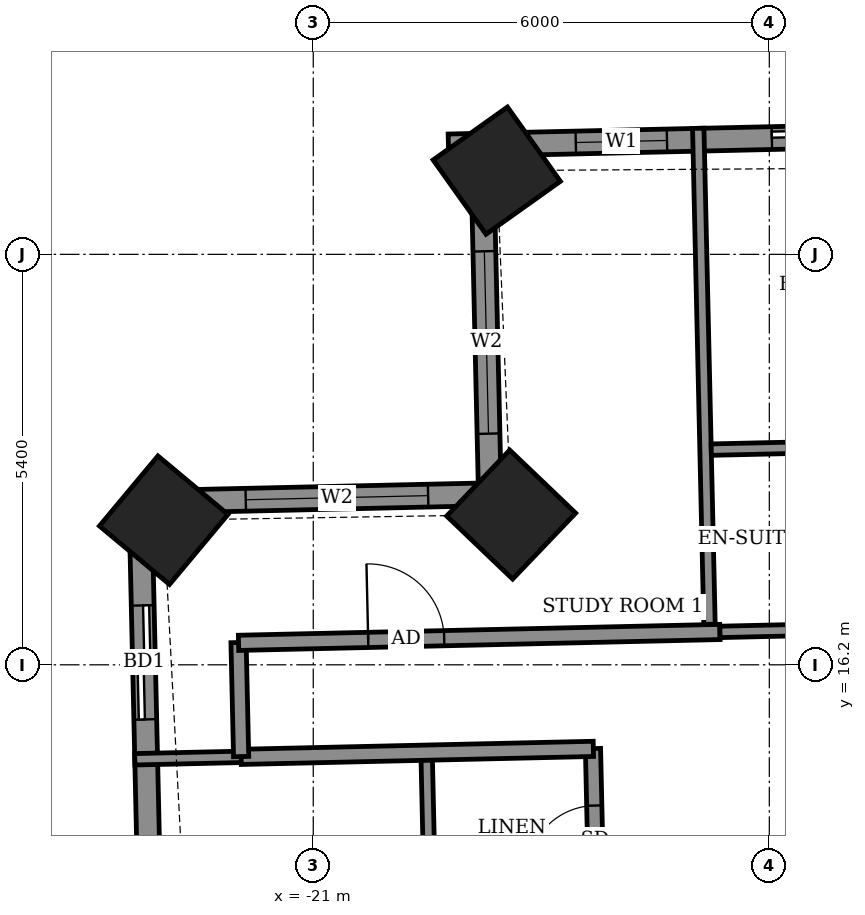
"""IFC4 building model, lengths in metres.
Left out: names, types, materials, properties, quantities, classifications, styles, units other than length and angle.
Written with IfcOpenShell. Run it as: python <this file> out.ifc"""

import sys

from ifc_helpers import new_model, si_unit, direction, frame, frame_2d, origin, origin_2d, place, context, subcontext, project, spatial, rectangle, extrude, element, fill, save


model = new_model("IFC4")
c1 = context("Model", 3, precision=1e-05, world=origin(), true_north=direction((0.0, 1.0)))
c2 = subcontext(c1, "Body", "Model", "MODEL_VIEW")
j1 = project(units=[si_unit("LENGTHUNIT", "METRE"), si_unit("PLANEANGLEUNIT", "RADIAN")], contexts=[c1])
p1 = place(None, origin())
s1 = spatial("IfcSite", under=j1, at=p1, CompositionType="ELEMENT")
p2 = place(p1, origin())
s2 = spatial("IfcBuilding", under=s1, at=p2, CompositionType="ELEMENT")
p3 = place(p2, frame((0.0, 0.0, 189.7)))
s3 = spatial("IfcBuildingStorey", under=s2, at=p3, CompositionType="ELEMENT", Elevation=189.7)
for number, where, z_axis, x_axis in (
    (1, (-18.586, 22.701, -0.55), (0.0, 0.0, 1.0), (-0.815, -0.58, 0.0)),
    (2, (-18.396, 18.177, -0.55), (0.0, 0.0, 1.0), (-0.691, -0.723, 0.0)),
    (3, (-22.968, 18.103, -0.55), (0.0, 0.0, 1.0), (-0.641, -0.768, 0.0)),
):
    element("IfcColumn", number, at=place(p3, frame(where, z_axis=z_axis, x_axis=x_axis)), inside=s3, PredefinedType="COLUMN", context=c2, shape_type="SweptSolid", body=[
        extrude(rectangle(XDim=1.2, YDim=1.2, at=origin_2d()), origin(), (0.0, 0.0, 1.0), 3.6),
    ])
p4 = place(p3, frame((21.589, 23.959, 0.0), z_axis=(0.0, 0.0, 1.0), x_axis=(-0.999742668524, -0.022684724649, 0.0)))
e4 = element("IfcWall", 4, at=p4, inside=s3, PredefinedType="SOLIDWALL", context=c2, shape_type="SweptSolid", body=[
    extrude(rectangle(XDim=40.822, YDim=0.3, at=frame_2d((20.411, 0.0))), origin(), (0.0, 0.0, 1.0), 3.05),
])
p5 = place(p4, frame((1.553, 0.0, 0.0)))
e5 = element("IfcOpeningElement", 5, at=p5, cuts=e4, PredefinedType="OPENING", context=c2, shape_type="SweptSolid", body=[
    extrude(rectangle(XDim=1.5, YDim=2.4, at=frame_2d((0.75, 1.2))), frame((0.0, 0.16, 0.0), z_axis=(0.0, -1.0, 0.0), x_axis=(1.0, 0.0, 0.0)), (0.0, 0.0, 1.0), 0.32),
])
p6 = place(p4, frame((4.33, 0.0, 0.0)))
e6 = element("IfcOpeningElement", 6, at=p6, cuts=e4, PredefinedType="OPENING", context=c2, shape_type="SweptSolid", body=[
    extrude(rectangle(XDim=1.5, YDim=2.4, at=frame_2d((0.75, 1.2))), frame((0.0, 0.16, 0.0), z_axis=(0.0, -1.0, 0.0), x_axis=(1.0, 0.0, 0.0)), (0.0, 0.0, 1.0), 0.32),
])
p7 = place(p4, frame((9.43, 0.0, 0.0)))
e7 = element("IfcOpeningElement", 7, at=p7, cuts=e4, PredefinedType="OPENING", context=c2, shape_type="SweptSolid", body=[
    extrude(rectangle(XDim=1.5, YDim=2.4, at=frame_2d((0.75, 1.2))), frame((0.0, 0.16, 0.0), z_axis=(0.0, -1.0, 0.0), x_axis=(1.0, 0.0, 0.0)), (0.0, 0.0, 1.0), 0.32),
])
p8 = place(p4, frame((14.37, 0.0, 0.0)))
e8 = element("IfcOpeningElement", 8, at=p8, cuts=e4, PredefinedType="OPENING", context=c2, shape_type="SweptSolid", body=[
    extrude(rectangle(XDim=1.5, YDim=2.4, at=frame_2d((0.75, 1.2))), frame((0.0, 0.16, 0.0), z_axis=(0.0, -1.0, 0.0), x_axis=(1.0, 0.0, 0.0)), (0.0, 0.0, 1.0), 0.32),
])
p9 = place(p4, frame((17.41, 0.0, 0.0)))
e9 = element("IfcOpeningElement", 9, at=p9, cuts=e4, PredefinedType="OPENING", context=c2, shape_type="SweptSolid", body=[
    extrude(rectangle(XDim=1.5, YDim=2.4, at=frame_2d((0.75, 1.2))), frame((0.0, 0.16, 0.0), z_axis=(0.0, -1.0, 0.0), x_axis=(1.0, 0.0, 0.0)), (0.0, 0.0, 1.0), 0.32),
])
p10 = place(p4, frame((22.03, 0.0, 0.0)))
e10 = element("IfcOpeningElement", 10, at=p10, cuts=e4, PredefinedType="OPENING", context=c2, shape_type="SweptSolid", body=[
    extrude(rectangle(XDim=1.5, YDim=2.4, at=frame_2d((0.75, 1.2))), frame((0.0, 0.16, 0.0), z_axis=(0.0, -1.0, 0.0), x_axis=(1.0, 0.0, 0.0)), (0.0, 0.0, 1.0), 0.32),
])
p11 = place(p4, frame((27.7, 0.0, 0.0)))
e11 = element("IfcOpeningElement", 11, at=p11, cuts=e4, PredefinedType="OPENING", context=c2, shape_type="SweptSolid", body=[
    extrude(rectangle(XDim=1.2, YDim=2.4, at=frame_2d((0.6, 1.2))), frame((0.0, 0.16, 0.0), z_axis=(0.0, -1.0, 0.0), x_axis=(1.0, 0.0, 0.0)), (0.0, 0.0, 1.0), 0.32),
])
p12 = place(p4, frame((30.48, 0.0, 0.0)))
e12 = element("IfcOpeningElement", 12, at=p12, cuts=e4, PredefinedType="OPENING", context=c2, shape_type="SweptSolid", body=[
    extrude(rectangle(XDim=1.5, YDim=2.4, at=frame_2d((0.75, 1.2))), frame((0.0, 0.16, 0.0), z_axis=(0.0, -1.0, 0.0), x_axis=(1.0, 0.0, 0.0)), (0.0, 0.0, 1.0), 0.32),
])
p13 = place(p4, frame((35.065, 0.0, 0.0)))
e13 = element("IfcOpeningElement", 13, at=p13, cuts=e4, PredefinedType="OPENING", context=c2, shape_type="SweptSolid", body=[
    extrude(rectangle(XDim=1.5, YDim=2.4, at=frame_2d((0.75, 1.2))), frame((0.0, 0.16, 0.0), z_axis=(0.0, -1.0, 0.0), x_axis=(1.0, 0.0, 0.0)), (0.0, 0.0, 1.0), 0.32),
])
p14 = place(p4, frame((37.945, 0.0, 0.9)))
e14 = element("IfcOpeningElement", 14, at=p14, cuts=e4, PredefinedType="OPENING", context=c2, shape_type="SweptSolid", body=[
    extrude(rectangle(XDim=1.2, YDim=1.5, at=frame_2d((0.6, 0.75))), frame((0.0, 0.16, 0.0), z_axis=(0.0, -1.0, 0.0), x_axis=(1.0, 0.0, 0.0)), (0.0, 0.0, 1.0), 0.32),
])
p15 = place(p3, frame((-18.781, 23.043, 0.0), z_axis=(0.0, 0.0, 1.0), x_axis=(0.02274729749, -0.999741246752, 0.0)))
e15 = element("IfcWall", 15, at=p15, inside=s3, PredefinedType="SOLIDWALL", context=c2, shape_type="SweptSolid", body=[
    extrude(rectangle(XDim=4.926, YDim=0.3, at=frame_2d((2.463, 0.0))), origin(), (0.0, 0.0, 1.0), 2.55),
])
p16 = place(p15, frame((1.403, 0.0, 0.9)))
e16 = element("IfcOpeningElement", 16, at=p16, cuts=e15, PredefinedType="OPENING", context=c2, shape_type="SweptSolid", body=[
    extrude(rectangle(XDim=2.4, YDim=1.5, at=frame_2d((1.2, 0.75))), frame((0.0, 0.16, 0.0), z_axis=(0.0, -1.0, 0.0), x_axis=(1.0, 0.0, 0.0)), (0.0, 0.0, 1.0), 0.32),
])
p17 = place(p3, frame((-18.676, 18.444, 0.0), z_axis=(0.0, 0.0, 1.0), x_axis=(-0.999744377441, -0.022609285172, 0.0)))
e17 = element("IfcWall", 17, at=p17, inside=s3, PredefinedType="SOLIDWALL", context=c2, shape_type="SweptSolid", body=[
    extrude(rectangle(XDim=4.6, YDim=0.3, at=frame_2d((2.3, 0.0))), origin(), (0.0, 0.0, 1.0), 2.55),
])
p18 = place(p17, frame((0.813, 0.0, 0.9)))
e18 = element("IfcOpeningElement", 18, at=p18, cuts=e17, PredefinedType="OPENING", context=c2, shape_type="SweptSolid", body=[
    extrude(rectangle(XDim=2.4, YDim=1.5, at=frame_2d((1.2, 0.75))), frame((0.0, 0.16, 0.0), z_axis=(0.0, -1.0, 0.0), x_axis=(1.0, 0.0, 0.0)), (0.0, 0.0, 1.0), 0.32),
])
p19 = place(p3, frame((-23.275, 18.34, 0.0), z_axis=(0.0, 0.0, 1.0), x_axis=(0.022705985163, -0.999742185885, 0.0)))
e19 = element("IfcWall", 19, at=p19, inside=s3, PredefinedType="SOLIDWALL", context=c2, shape_type="SweptSolid", body=[
    extrude(rectangle(XDim=10.43, YDim=0.3, at=frame_2d((5.215, 0.0))), origin(), (0.0, 0.0, 1.0), 3.05),
])
p20 = place(p19, frame((1.359, 0.0, 0.0)))
e20 = element("IfcOpeningElement", 20, at=p20, cuts=e19, PredefinedType="OPENING", context=c2, shape_type="SweptSolid", body=[
    extrude(rectangle(XDim=1.5, YDim=2.4, at=frame_2d((0.75, 1.2))), frame((0.0, 0.16, 0.0), z_axis=(0.0, -1.0, 0.0), x_axis=(1.0, 0.0, 0.0)), (0.0, 0.0, 1.0), 0.32),
])
p21 = place(p19, frame((6.543, 0.0, 0.9)))
e21 = element("IfcOpeningElement", 21, at=p21, cuts=e19, PredefinedType="OPENING", context=c2, shape_type="SweptSolid", body=[
    extrude(rectangle(XDim=2.4, YDim=1.5, at=frame_2d((1.2, 0.75))), frame((0.0, 0.16, 0.0), z_axis=(0.0, -1.0, 0.0), x_axis=(1.0, 0.0, 0.0)), (0.0, 0.0, 1.0), 0.32),
])
p22 = place(p3, frame((-16.684, -12.919, 0.0), z_axis=(0.0, 0.0, 1.0), x_axis=(-0.022694293906, 0.999742451346, 0.0)))
e22 = element("IfcWall", 22, at=p22, inside=s3, PredefinedType="PARTITIONING", context=c2, shape_type="SweptSolid", body=[
    extrude(rectangle(XDim=28.024, YDim=0.2, at=frame_2d((14.012, 0.0))), origin(), (0.0, 0.0, 1.0), 3.05),
])
p23 = place(p22, frame((22.825, 0.0, 0.0)))
e23 = element("IfcOpeningElement", 23, at=p23, cuts=e22, PredefinedType="OPENING", context=c2, shape_type="SweptSolid", body=[
    extrude(rectangle(XDim=1.0, YDim=2.1, at=frame_2d((0.5, 1.05))), frame((0.0, 0.11, 0.0), z_axis=(0.0, -1.0, 0.0), x_axis=(1.0, 0.0, 0.0)), (0.0, 0.0, 1.0), 0.22),
])
p24 = place(p22, frame((26.374, 0.0, 0.0)))
e24 = element("IfcOpeningElement", 24, at=p24, cuts=e22, PredefinedType="OPENING", context=c2, shape_type="SweptSolid", body=[
    extrude(rectangle(XDim=0.9, YDim=2.1, at=frame_2d((0.45, 1.05))), frame((0.0, 0.11, 0.0), z_axis=(0.0, -1.0, 0.0), x_axis=(1.0, 0.0, 0.0)), (0.0, 0.0, 1.0), 0.22),
])
p25 = place(p22, frame((16.7, 0.0, 0.0)))
e25 = element("IfcOpeningElement", 25, at=p25, cuts=e22, PredefinedType="OPENING", context=c2, shape_type="SweptSolid", body=[
    extrude(rectangle(XDim=1.0, YDim=2.1, at=frame_2d((0.5, 1.05))), frame((0.0, 0.11, 0.0), z_axis=(0.0, -1.0, 0.0), x_axis=(1.0, 0.0, 0.0)), (0.0, 0.0, 1.0), 0.22),
])
p26 = place(p22, frame((19.175, 0.0, 0.0)))
e26 = element("IfcOpeningElement", 26, at=p26, cuts=e22, PredefinedType="OPENING", context=c2, shape_type="SweptSolid", body=[
    extrude(rectangle(XDim=0.9, YDim=2.1, at=frame_2d((0.45, 1.05))), frame((0.0, 0.11, 0.0), z_axis=(0.0, -1.0, 0.0), x_axis=(1.0, 0.0, 0.0)), (0.0, 0.0, 1.0), 0.22),
])
p27 = place(p22, frame((14.725, 0.0, 0.0)))
e27 = element("IfcOpeningElement", 27, at=p27, cuts=e22, PredefinedType="OPENING", context=c2, shape_type="SweptSolid", body=[
    extrude(rectangle(XDim=1.0, YDim=2.1, at=frame_2d((0.5, 1.05))), frame((0.0, 0.11, 0.0), z_axis=(0.0, -1.0, 0.0), x_axis=(1.0, 0.0, 0.0)), (0.0, 0.0, 1.0), 0.22),
])
p28 = place(p22, frame((12.625, 0.0, 0.0)))
e28 = element("IfcOpeningElement", 28, at=p28, cuts=e22, PredefinedType="OPENING", context=c2, shape_type="SweptSolid", body=[
    extrude(rectangle(XDim=0.9, YDim=2.1, at=frame_2d((0.45, 1.05))), frame((0.0, 0.11, 0.0), z_axis=(0.0, -1.0, 0.0), x_axis=(1.0, 0.0, 0.0)), (0.0, 0.0, 1.0), 0.22),
])
p29 = place(p22, frame((10.375, 0.0, 0.0)))
e29 = element("IfcOpeningElement", 29, at=p29, cuts=e22, PredefinedType="OPENING", context=c2, shape_type="SweptSolid", body=[
    extrude(rectangle(XDim=1.0, YDim=2.1, at=frame_2d((0.5, 1.05))), frame((0.0, 0.11, 0.0), z_axis=(0.0, -1.0, 0.0), x_axis=(1.0, 0.0, 0.0)), (0.0, 0.0, 1.0), 0.22),
])
p30 = place(p22, frame((8.125, 0.0, 0.0)))
e30 = element("IfcOpeningElement", 30, at=p30, cuts=e22, PredefinedType="OPENING", context=c2, shape_type="SweptSolid", body=[
    extrude(rectangle(XDim=0.9, YDim=2.1, at=frame_2d((0.45, 1.05))), frame((0.0, 0.11, 0.0), z_axis=(0.0, -1.0, 0.0), x_axis=(1.0, 0.0, 0.0)), (0.0, 0.0, 1.0), 0.22),
])
p31 = place(p22, frame((3.462, 0.0, 0.0)))
e31 = element("IfcOpeningElement", 31, at=p31, cuts=e22, PredefinedType="OPENING", context=c2, shape_type="SweptSolid", body=[
    extrude(rectangle(XDim=1.0, YDim=2.1, at=frame_2d((0.5, 1.05))), frame((0.0, 0.11, 0.0), z_axis=(0.0, -1.0, 0.0), x_axis=(1.0, 0.0, 0.0)), (0.0, 0.0, 1.0), 0.22),
])
p32 = place(p22, frame((5.625, 0.0, 0.0)))
e32 = element("IfcOpeningElement", 32, at=p32, cuts=e22, PredefinedType="OPENING", context=c2, shape_type="SweptSolid", body=[
    extrude(rectangle(XDim=0.9, YDim=2.1, at=frame_2d((0.45, 1.05))), frame((0.0, 0.11, 0.0), z_axis=(0.0, -1.0, 0.0), x_axis=(1.0, 0.0, 0.0)), (0.0, 0.0, 1.0), 0.22),
])
p33 = place(p3, frame((-19.455, 12.649, 0.0), z_axis=(0.0, 0.0, 1.0), x_axis=(-0.022603288534, 0.999744513037, 0.0)))
e33 = element("IfcWall", 33, at=p33, inside=s3, PredefinedType="PARTITIONING", context=c2, shape_type="SweptSolid", body=[
    extrude(rectangle(XDim=2.301, YDim=0.15, at=frame_2d((1.15, 0.0))), origin(), (0.0, 0.0, 1.0), 3.05),
])
p34 = place(p3, frame((-23.348, 14.957, 0.0), z_axis=(0.0, 0.0, 1.0), x_axis=(0.999740216184, 0.022792545827, 0.0)))
e34 = element("IfcWall", 34, at=p34, inside=s3, PredefinedType="PARTITIONING", context=c2, shape_type="SweptSolid", body=[
    extrude(rectangle(XDim=1.403, YDim=0.15, at=frame_2d((0.702, 0.0))), origin(), (0.0, 0.0, 1.0), 2.55),
])
p35 = place(p3, frame((-21.949, 14.989, 0.0), z_axis=(0.0, 0.0, 1.0), x_axis=(0.999743491588, 0.022648422179, 0.0)))
e35 = element("IfcWall", 35, at=p35, inside=s3, PredefinedType="PARTITIONING", context=c2, shape_type="SweptSolid", body=[
    extrude(rectangle(XDim=4.635, YDim=0.2, at=frame_2d((2.318, 0.0))), origin(), (0.0, 0.0, 1.0), 3.05),
])
p36 = place(p3, frame((-21.949, 14.993, 0.0), z_axis=(0.0, 0.0, 1.0), x_axis=(-0.022617910375, 0.999744182344, 0.0)))
e36 = element("IfcWall", 36, at=p36, inside=s3, PredefinedType="PARTITIONING", context=c2, shape_type="SweptSolid", body=[
    extrude(rectangle(XDim=1.5, YDim=0.2, at=frame_2d((0.75, 0.0))), origin(), (0.0, 0.0, 1.0), 3.05),
])
p37 = place(p3, frame((-21.983, 16.489, 0.0), z_axis=(0.0, 0.0, 1.0), x_axis=(0.999744930163, 0.022584831499, 0.0)))
e37 = element("IfcWall", 37, at=p37, inside=s3, PredefinedType="PARTITIONING", context=c2, shape_type="SweptSolid", body=[
    extrude(rectangle(XDim=6.335, YDim=0.2, at=frame_2d((3.167, 0.0))), origin(), (0.0, 0.0, 1.0), 3.05),
])
p38 = place(p37, frame((1.706, 0.0, 0.0)))
e38 = element("IfcOpeningElement", 38, at=p38, cuts=e37, PredefinedType="OPENING", context=c2, shape_type="SweptSolid", body=[
    extrude(rectangle(XDim=1.0, YDim=2.1, at=frame_2d((0.5, 1.05))), frame((0.0, 0.11, 0.0), z_axis=(0.0, -1.0, 0.0), x_axis=(1.0, 0.0, 0.0)), (0.0, 0.0, 1.0), 0.22),
])
p39 = place(p3, frame((-15.649, 16.633, 0.0), z_axis=(0.0, 0.0, 1.0), x_axis=(0.999743261737, 0.022658565952, 0.0)))
e39 = element("IfcWall", 39, at=p39, inside=s3, PredefinedType="PARTITIONING", context=c2, shape_type="SweptSolid", body=[
    extrude(rectangle(XDim=30.536, YDim=0.15, at=frame_2d((15.268, 0.0))), origin(), (0.0, 0.0, 1.0), 3.05),
])
p40 = place(p39, frame((29.536, 0.0, 0.0)))
e40 = element("IfcOpeningElement", 40, at=p40, cuts=e39, PredefinedType="OPENING", context=c2, shape_type="SweptSolid", body=[
    extrude(rectangle(XDim=0.9, YDim=2.1, at=frame_2d((0.45, 1.05))), frame((0.0, 0.085, 0.0), z_axis=(0.0, -1.0, 0.0), x_axis=(1.0, 0.0, 0.0)), (0.0, 0.0, 1.0), 0.17),
])
p41 = place(p39, frame((27.965, 0.0, 0.0)))
e41 = element("IfcOpeningElement", 41, at=p41, cuts=e39, PredefinedType="OPENING", context=c2, shape_type="SweptSolid", body=[
    extrude(rectangle(XDim=0.9, YDim=2.1, at=frame_2d((0.45, 1.05))), frame((0.0, 0.085, 0.0), z_axis=(0.0, -1.0, 0.0), x_axis=(1.0, 0.0, 0.0)), (0.0, 0.0, 1.0), 0.17),
])
p42 = place(p39, frame((21.365, 0.0, 0.0)))
e42 = element("IfcOpeningElement", 42, at=p42, cuts=e39, PredefinedType="OPENING", context=c2, shape_type="SweptSolid", body=[
    extrude(rectangle(XDim=0.9, YDim=2.1, at=frame_2d((0.45, 1.05))), frame((0.0, 0.085, 0.0), z_axis=(0.0, -1.0, 0.0), x_axis=(1.0, 0.0, 0.0)), (0.0, 0.0, 1.0), 0.17),
])
p43 = place(p39, frame((19.565, 0.0, 0.0)))
e43 = element("IfcOpeningElement", 43, at=p43, cuts=e39, PredefinedType="OPENING", context=c2, shape_type="SweptSolid", body=[
    extrude(rectangle(XDim=0.9, YDim=2.1, at=frame_2d((0.45, 1.05))), frame((0.0, 0.085, 0.0), z_axis=(0.0, -1.0, 0.0), x_axis=(1.0, 0.0, 0.0)), (0.0, 0.0, 1.0), 0.17),
])
p44 = place(p39, frame((12.965, 0.0, 0.0)))
e44 = element("IfcOpeningElement", 44, at=p44, cuts=e39, PredefinedType="OPENING", context=c2, shape_type="SweptSolid", body=[
    extrude(rectangle(XDim=0.9, YDim=2.1, at=frame_2d((0.45, 1.05))), frame((0.0, 0.085, 0.0), z_axis=(0.0, -1.0, 0.0), x_axis=(1.0, 0.0, 0.0)), (0.0, 0.0, 1.0), 0.17),
])
p45 = place(p39, frame((11.14, 0.0, 0.0)))
e45 = element("IfcOpeningElement", 45, at=p45, cuts=e39, PredefinedType="OPENING", context=c2, shape_type="SweptSolid", body=[
    extrude(rectangle(XDim=0.9, YDim=2.1, at=frame_2d((0.45, 1.05))), frame((0.0, 0.085, 0.0), z_axis=(0.0, -1.0, 0.0), x_axis=(1.0, 0.0, 0.0)), (0.0, 0.0, 1.0), 0.17),
])
p46 = place(p39, frame((4.515, 0.0, 0.0)))
e46 = element("IfcOpeningElement", 46, at=p46, cuts=e39, PredefinedType="OPENING", context=c2, shape_type="SweptSolid", body=[
    extrude(rectangle(XDim=0.9, YDim=2.1, at=frame_2d((0.45, 1.05))), frame((0.0, 0.085, 0.0), z_axis=(0.0, -1.0, 0.0), x_axis=(1.0, 0.0, 0.0)), (0.0, 0.0, 1.0), 0.17),
])
p47 = place(p39, frame((2.715, 0.0, 0.0)))
e47 = element("IfcOpeningElement", 47, at=p47, cuts=e39, PredefinedType="OPENING", context=c2, shape_type="SweptSolid", body=[
    extrude(rectangle(XDim=0.9, YDim=2.1, at=frame_2d((0.45, 1.05))), frame((0.0, 0.085, 0.0), z_axis=(0.0, -1.0, 0.0), x_axis=(1.0, 0.0, 0.0)), (0.0, 0.0, 1.0), 0.17),
])
p48 = place(p3, frame((-15.787, 16.733, 0.0), z_axis=(0.0, 0.0, 1.0), x_axis=(-0.022667874761, 0.999743050715, 0.0)))
e48 = element("IfcWall", 48, at=p48, inside=s3, PredefinedType="PARTITIONING", context=c2, shape_type="SweptSolid", body=[
    extrude(rectangle(XDim=6.527, YDim=0.15, at=frame_2d((3.263, 0.0))), origin(), (0.0, 0.0, 1.0), 2.55),
])
p49 = place(p3, frame((-15.764, 19.031, 0.0), z_axis=(0.0, 0.0, 1.0), x_axis=(0.999749954681, 0.022361308448, 0.0)))
e49 = element("IfcWall", 49, at=p49, inside=s3, PredefinedType="PARTITIONING", context=c2, shape_type="SweptSolid", body=[
    extrude(rectangle(XDim=2.325, YDim=0.15, at=frame_2d((1.163, 0.0))), origin(), (0.0, 0.0, 1.0), 3.05),
])
p50 = place(p13, origin())
e50 = element("IfcDoor", 50, at=p50, inside=s3, OperationType="SLIDING_TO_LEFT", PredefinedType="DOOR", context=c2, shape_type="SweptSolid", body=[
    extrude(rectangle(XDim=1.5, YDim=2.4, at=frame_2d((0.75, 1.2))), frame((0.0, 0.025, 0.0), z_axis=(0.0, -1.0, 0.0), x_axis=(1.0, 0.0, 0.0)), (0.0, 0.0, 1.0), 0.05),
])
fill(e13, e50)
p51 = place(p14, origin())
e51 = element("IfcWindow", 51, at=p51, inside=s3, PartitioningType="SINGLE_PANEL", PredefinedType="WINDOW", context=c2, shape_type="SweptSolid", body=[
    extrude(rectangle(XDim=1.2, YDim=1.5, at=frame_2d((0.6, 0.75))), frame((0.0, 0.03, 0.0), z_axis=(0.0, -1.0, 0.0), x_axis=(1.0, 0.0, 0.0)), (0.0, 0.0, 1.0), 0.06),
])
fill(e14, e51)
p52 = place(p16, origin())
e52 = element("IfcWindow", 52, at=p52, inside=s3, PartitioningType="DOUBLE_PANEL_VERTICAL", PredefinedType="WINDOW", context=c2, shape_type="SweptSolid", body=[
    extrude(rectangle(XDim=2.4, YDim=1.5, at=frame_2d((1.2, 0.75))), frame((0.0, 0.03, 0.0), z_axis=(0.0, -1.0, 0.0), x_axis=(1.0, 0.0, 0.0)), (0.0, 0.0, 1.0), 0.06),
])
fill(e16, e52)
p53 = place(p18, origin())
e53 = element("IfcWindow", 53, at=p53, inside=s3, PartitioningType="DOUBLE_PANEL_VERTICAL", PredefinedType="WINDOW", context=c2, shape_type="SweptSolid", body=[
    extrude(rectangle(XDim=2.4, YDim=1.5, at=frame_2d((1.2, 0.75))), frame((0.0, 0.03, 0.0), z_axis=(0.0, -1.0, 0.0), x_axis=(1.0, 0.0, 0.0)), (0.0, 0.0, 1.0), 0.06),
])
fill(e18, e53)
p54 = place(p20, origin())
e54 = element("IfcDoor", 54, at=p54, inside=s3, OperationType="SLIDING_TO_LEFT", PredefinedType="DOOR", context=c2, shape_type="SweptSolid", body=[
    extrude(rectangle(XDim=1.5, YDim=2.4, at=frame_2d((0.75, 1.2))), frame((0.0, 0.025, 0.0), z_axis=(0.0, -1.0, 0.0), x_axis=(1.0, 0.0, 0.0)), (0.0, 0.0, 1.0), 0.05),
])
fill(e20, e54)
p55 = place(p38, origin())
e55 = element("IfcDoor", 55, at=p55, inside=s3, OperationType="SINGLE_SWING_LEFT", PredefinedType="DOOR", context=c2, shape_type="SweptSolid", body=[
    extrude(rectangle(XDim=1.0, YDim=2.1, at=frame_2d((0.5, 1.05))), frame((0.0, 0.025, 0.0), z_axis=(0.0, -1.0, 0.0), x_axis=(1.0, 0.0, 0.0)), (0.0, 0.0, 1.0), 0.05),
])
fill(e38, e55)
p56 = place(p24, origin())
e56 = element("IfcDoor", 56, at=p56, inside=s3, OperationType="SINGLE_SWING_RIGHT", PredefinedType="DOOR", context=c2, shape_type="SweptSolid", body=[
    extrude(rectangle(XDim=0.9, YDim=2.1, at=frame_2d((0.45, 1.05))), frame((0.0, 0.025, 0.0), z_axis=(0.0, -1.0, 0.0), x_axis=(1.0, 0.0, 0.0)), (0.0, 0.0, 1.0), 0.05),
])
fill(e24, e56)
save(model, sys.argv[1])
